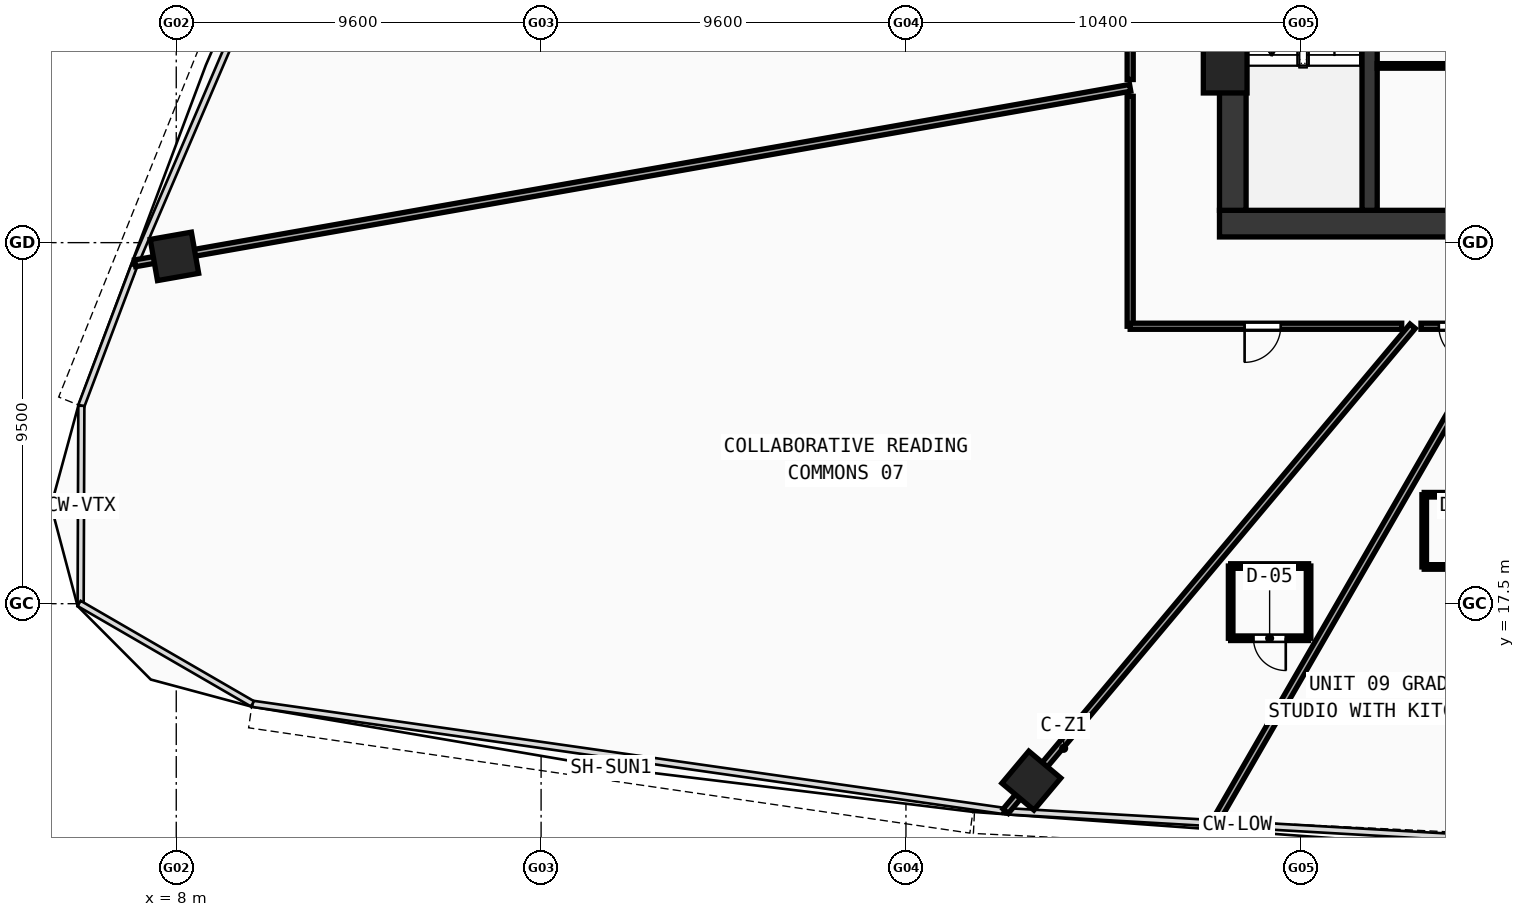
"""IFC4 building model, lengths in metres.
Left out: names, types, materials, properties, quantities, classifications, styles, units other than length and angle.
Written with IfcOpenShell. Run it as: python <this file> out.ifc"""

import sys

from ifc_helpers import new_model, si_unit, direction, frame, frame_2d, origin, origin_with_axes, origin_2d, place, context, subcontext, project, spatial, rectangle, hollow_rectangle, extrude, source, transform, mapped, element, fill, save


model = new_model("IFC4")
c1 = context("Model", 3, precision=1e-05, world=origin(), true_north=direction((0.0, 1.0)))
c2 = subcontext(c1, "Body", "Model", "MODEL_VIEW")
j1 = project(units=[si_unit("LENGTHUNIT", "METRE"), si_unit("PLANEANGLEUNIT", "RADIAN")], contexts=[c1])
p1 = place(None, origin())
s1 = spatial("IfcSite", under=j1, at=p1, CompositionType="ELEMENT")
p2 = place(p1, origin())
s2 = spatial("IfcBuilding", under=s1, at=p2, CompositionType="ELEMENT")
p3 = place(p2, frame((0.0, 0.0, 70.33)))
s3 = spatial("IfcBuildingStorey", under=s2, at=p3, CompositionType="ELEMENT", Elevation=70.33)
p4 = place(p3, frame((35.45, 27.5, 0.0), z_axis=(0.0, 0.0, 1.0), x_axis=(1.0, 0.0, 0.0)))
e1 = element("IfcWall", 1, at=p4, inside=s3, PredefinedType="SHEAR", context=c2, shape_type="SweptSolid", body=[
    extrude(rectangle(XDim=25.1, YDim=0.7, at=frame_2d((12.55, 0.0))), origin(), (0.0, 0.0, 1.0), 5.77),
])
p5 = place(p3, frame((35.8, 27.85, 0.0), z_axis=(0.0, 0.0, 1.0), x_axis=(0.0, 1.0, 0.0)))
e2 = element("IfcWall", 2, at=p5, inside=s3, PredefinedType="SHEAR", context=c2, shape_type="SweptSolid", body=[
    extrude(rectangle(XDim=12.0, YDim=0.7, at=frame_2d((6.0, 0.0))), origin(), (0.0, 0.0, 1.0), 5.77),
])
p6 = place(p3, frame((39.4, 27.85, 0.0), z_axis=(0.0, 0.0, 1.0), x_axis=(0.0, 1.0, 0.0)))
e3 = element("IfcWall", 3, at=p6, inside=s3, PredefinedType="SHEAR", context=c2, shape_type="SweptSolid", body=[
    extrude(rectangle(XDim=12.0, YDim=0.4, at=frame_2d((6.0, 0.0))), origin(), (0.0, 0.0, 1.0), 5.77),
])
p7 = place(p6, frame((9.9, 0.0, 0.0)))
e4 = element("IfcOpeningElement", 4, at=p7, cuts=e3, PredefinedType="OPENING", context=c2, shape_type="SweptSolid", body=[
    extrude(rectangle(XDim=1.1, YDim=2.1, at=frame_2d((0.55, 1.05))), frame((0.0, 0.21, 0.0), z_axis=(0.0, -1.0, 0.0), x_axis=(1.0, 0.0, 0.0)), (0.0, 0.0, 1.0), 0.42),
])
m1 = source(origin(), c2, "Body", "SweptSolid", [
    extrude(hollow_rectangle(XDim=1.15, YDim=1.15, WallThickness=0.048, at=origin_2d()), origin(), (0.0, 0.0, 1.0), 6.03),
])
p8 = place(p3, frame((35.6, 31.513, -0.26), z_axis=(0.0, 0.0, 1.0), x_axis=(1.0, 0.0, 0.0)))
e5 = element("IfcColumn", 5, at=p8, inside=s3, PredefinedType="COLUMN", context=c2, shape_type="MappedRepresentation", body=[
    mapped(m1, transform((0.0, 0.0, 0.0), scale=1.0)),
])
m2 = source(origin(), c2, "Body", "SweptSolid", [
    extrude(hollow_rectangle(XDim=1.1, YDim=1.1, WallThickness=0.045, at=origin_2d()), origin(), (0.0, 0.0, 1.0), 6.03),
])
for number, where, z_axis, x_axis in (
    (6, (30.5, 12.844, -0.26), (0.0, 0.0, 1.0), (0.766, -0.643, 0.0)),
    (7, (7.952, 26.638, -0.26), (0.0, 0.0, 1.0), (0.174, -0.985, 0.0)),
):
    element("IfcColumn", number, at=place(p3, frame(where, z_axis=z_axis, x_axis=x_axis)), inside=s3, PredefinedType="COLUMN", context=c2, shape_type="MappedRepresentation", body=[
        mapped(m2, transform((0.0, 0.0, 0.0), scale=1.0)),
    ])
p9 = place(p3, frame((39.6, 31.65, 0.0), z_axis=(0.0, 0.0, 1.0), x_axis=(1.0, 0.0, 0.0)))
e8 = element("IfcWall", 8, at=p9, inside=s3, PredefinedType="PARTITIONING", context=c2, shape_type="SweptSolid", body=[
    extrude(rectangle(XDim=2.72, YDim=0.12, at=frame_2d((1.36, 0.0))), origin(), (0.0, 0.0, 1.0), 5.77),
])
p10 = place(p3, frame((33.1, 31.073, 0.0), z_axis=(0.0, 0.0, 1.0), x_axis=(-0.984808509529, -0.173643887195, 0.0)))
e9 = element("IfcWall", 9, at=p10, inside=s3, PredefinedType="PARTITIONING", context=c2, shape_type="SweptSolid", body=[
    extrude(rectangle(XDim=26.586, YDim=0.18, at=frame_2d((13.293, 0.0))), origin(), (0.0, 0.0, 1.0), 2.42),
])
p11 = place(p3, frame((40.532, 24.8, 0.0), z_axis=(0.0, 0.0, 1.0), x_axis=(-0.642782945965, -0.766048356422, 0.0)))
e10 = element("IfcWall", 10, at=p11, inside=s3, PredefinedType="PARTITIONING", context=c2, shape_type="SweptSolid", body=[
    extrude(rectangle(XDim=16.657, YDim=0.18, at=frame_2d((8.329, 0.0))), origin(), (0.0, 0.0, 1.0), 2.42),
])
p12 = place(p3, frame((42.862, 24.8, 0.0), z_axis=(0.0, 0.0, 1.0), x_axis=(-0.499994448746, -0.866028608779, 0.0)))
e11 = element("IfcWall", 11, at=p12, inside=s3, PredefinedType="PARTITIONING", context=c2, shape_type="SweptSolid", body=[
    extrude(rectangle(XDim=15.099, YDim=0.18, at=frame_2d((7.55, 0.0))), origin(), (0.0, 0.0, 1.0), 5.07),
])
p13 = place(p3, frame((33.1, 24.8, 0.0), z_axis=(0.0, 0.0, 1.0), x_axis=(0.0, 1.0, 0.0)))
e12 = element("IfcWall", 12, at=p13, inside=s3, PredefinedType="PARTITIONING", context=c2, shape_type="SweptSolid", body=[
    extrude(rectangle(XDim=6.049, YDim=0.16, at=frame_2d((3.025, 0.0))), origin(), (0.0, 0.0, 1.0), 2.42),
])
p14 = place(p3, frame((33.1, 31.292, 0.0), z_axis=(0.0, 0.0, 1.0), x_axis=(0.0, 1.0, 0.0)))
e13 = element("IfcWall", 13, at=p14, inside=s3, PredefinedType="PARTITIONING", context=c2, shape_type="SweptSolid", body=[
    extrude(rectangle(XDim=7.029, YDim=0.16, at=frame_2d((3.515, 0.0))), origin(), (0.0, 0.0, 1.0), 2.42),
])
p15 = place(p14, frame((3.04, 0.0, 0.0)))
e14 = element("IfcOpeningElement", 14, at=p15, cuts=e13, PredefinedType="OPENING", context=c2, shape_type="SweptSolid", body=[
    extrude(rectangle(XDim=0.95, YDim=2.1, at=frame_2d((0.475, 1.05))), frame((0.0, 0.09, 0.0), z_axis=(0.0, -1.0, 0.0), x_axis=(1.0, 0.0, 0.0)), (0.0, 0.0, 1.0), 0.18),
])
p16 = place(p3, frame((42.608, 24.8, 0.0), z_axis=(0.0, 0.0, 1.0), x_axis=(-1.0, 0.0, 0.0)))
e15 = element("IfcWall", 15, at=p16, inside=s3, PredefinedType="PARTITIONING", context=c2, shape_type="SweptSolid", body=[
    extrude(rectangle(XDim=1.856, YDim=0.16, at=frame_2d((0.928, 0.0))), origin(), (0.0, 0.0, 1.0), 2.42),
])
p17 = place(p16, frame((0.436, 0.0, 0.0)))
e16 = element("IfcOpeningElement", 16, at=p17, cuts=e15, PredefinedType="OPENING", context=c2, shape_type="SweptSolid", body=[
    extrude(rectangle(XDim=0.95, YDim=2.1, at=frame_2d((0.475, 1.05))), frame((0.0, 0.09, 0.0), z_axis=(0.0, -1.0, 0.0), x_axis=(1.0, 0.0, 0.0)), (0.0, 0.0, 1.0), 0.18),
])
p18 = place(p3, frame((40.245, 24.8, 0.0), z_axis=(0.0, 0.0, 1.0), x_axis=(-1.0, 0.0, 0.0)))
e17 = element("IfcWall", 17, at=p18, inside=s3, PredefinedType="PARTITIONING", context=c2, shape_type="SweptSolid", body=[
    extrude(rectangle(XDim=7.145, YDim=0.16, at=frame_2d((3.572, 0.0))), origin(), (0.0, 0.0, 1.0), 2.42),
])
p19 = place(p18, frame((3.184, 0.0, 0.0)))
e18 = element("IfcOpeningElement", 18, at=p19, cuts=e17, PredefinedType="OPENING", context=c2, shape_type="SweptSolid", body=[
    extrude(rectangle(XDim=0.95, YDim=2.1, at=frame_2d((0.475, 1.05))), frame((0.0, 0.09, 0.0), z_axis=(0.0, -1.0, 0.0), x_axis=(1.0, 0.0, 0.0)), (0.0, 0.0, 1.0), 0.18),
])
p20 = place(p3, frame((35.744, 16.591, 0.0), z_axis=(0.0, 0.0, 1.0), x_axis=(1.0, 0.0, 0.0)))
e19 = element("IfcWall", 19, at=p20, inside=s3, PredefinedType="PARTITIONING", context=c2, shape_type="SweptSolid", body=[
    extrude(rectangle(XDim=2.05, YDim=0.12, at=frame_2d((1.025, 0.0))), origin(), (0.0, 0.0, 1.0), 5.77),
])
p21 = place(p20, frame((0.6, 0.0, 0.0)))
e20 = element("IfcOpeningElement", 20, at=p21, cuts=e19, PredefinedType="OPENING", context=c2, shape_type="SweptSolid", body=[
    extrude(rectangle(XDim=0.85, YDim=2.1, at=frame_2d((0.425, 1.05))), frame((0.0, 0.07, 0.0), z_axis=(0.0, -1.0, 0.0), x_axis=(1.0, 0.0, 0.0)), (0.0, 0.0, 1.0), 0.14),
])
p22 = place(p3, frame((37.794, 16.591, 0.0), z_axis=(0.0, 0.0, 1.0), x_axis=(0.0, 1.0, 0.0)))
e21 = element("IfcWall", 21, at=p22, inside=s3, PredefinedType="PARTITIONING", context=c2, shape_type="SweptSolid", body=[
    extrude(rectangle(XDim=1.9, YDim=0.12, at=frame_2d((0.95, 0.0))), origin(), (0.0, 0.0, 1.0), 5.37),
])
p23 = place(p3, frame((37.794, 18.491, 0.0), z_axis=(0.0, 0.0, 1.0), x_axis=(-1.0, 0.0, 0.0)))
e22 = element("IfcWall", 22, at=p23, inside=s3, PredefinedType="PARTITIONING", context=c2, shape_type="SweptSolid", body=[
    extrude(rectangle(XDim=2.05, YDim=0.12, at=frame_2d((1.025, 0.0))), origin(), (0.0, 0.0, 1.0), 2.42),
])
p24 = place(p3, frame((35.744, 18.491, 0.0), z_axis=(0.0, 0.0, 1.0), x_axis=(0.0, -1.0, 0.0)))
e23 = element("IfcWall", 23, at=p24, inside=s3, PredefinedType="PARTITIONING", context=c2, shape_type="SweptSolid", body=[
    extrude(rectangle(XDim=1.9, YDim=0.12, at=frame_2d((0.95, 0.0))), origin(), (0.0, 0.0, 1.0), 2.42),
])
p25 = place(p3, frame((40.837, 18.467, 0.0), z_axis=(0.0, 0.0, 1.0), x_axis=(1.0, 0.0, 0.0)))
e24 = element("IfcWall", 24, at=p25, inside=s3, PredefinedType="PARTITIONING", context=c2, shape_type="SweptSolid", body=[
    extrude(rectangle(XDim=2.05, YDim=0.12, at=frame_2d((1.025, 0.0))), origin(), (0.0, 0.0, 1.0), 5.77),
])
p26 = place(p25, frame((0.6, 0.0, 0.0)))
e25 = element("IfcOpeningElement", 25, at=p26, cuts=e24, PredefinedType="OPENING", context=c2, shape_type="SweptSolid", body=[
    extrude(rectangle(XDim=0.85, YDim=2.1, at=frame_2d((0.425, 1.05))), frame((0.0, 0.07, 0.0), z_axis=(0.0, -1.0, 0.0), x_axis=(1.0, 0.0, 0.0)), (0.0, 0.0, 1.0), 0.14),
])
p27 = place(p3, frame((42.887, 20.367, 0.0), z_axis=(0.0, 0.0, 1.0), x_axis=(-1.0, 0.0, 0.0)))
e26 = element("IfcWall", 26, at=p27, inside=s3, PredefinedType="PARTITIONING", context=c2, shape_type="SweptSolid", body=[
    extrude(rectangle(XDim=2.05, YDim=0.12, at=frame_2d((1.025, 0.0))), origin(), (0.0, 0.0, 1.0), 5.77),
])
p28 = place(p3, frame((40.837, 20.367, 0.0), z_axis=(0.0, 0.0, 1.0), x_axis=(0.0, -1.0, 0.0)))
e27 = element("IfcWall", 27, at=p28, inside=s3, PredefinedType="PARTITIONING", context=c2, shape_type="SweptSolid", body=[
    extrude(rectangle(XDim=1.9, YDim=0.12, at=frame_2d((0.95, 0.0))), origin(), (0.0, 0.0, 1.0), 5.77),
])
m3 = source(origin(), c2, "Body", "SweptSolid", [
    extrude(rectangle(XDim=0.95, YDim=2.1, at=frame_2d((0.475, 1.05))), frame((0.0, 0.025, 0.0), z_axis=(0.0, -1.0, 0.0), x_axis=(1.0, 0.0, 0.0)), (0.0, 0.0, 1.0), 0.05),
])
p29 = place(p19, origin_with_axes())
e28 = element("IfcDoor", 28, at=p29, inside=s3, OperationType="SINGLE_SWING_RIGHT", PredefinedType="DOOR", context=c2, shape_type="MappedRepresentation", body=[
    mapped(m3, transform((0.0, 0.0, 0.0), scale=1.0)),
])
fill(e18, e28)
p30 = place(p17, origin_with_axes())
e29 = element("IfcDoor", 29, at=p30, inside=s3, OperationType="SINGLE_SWING_LEFT", PredefinedType="DOOR", context=c2, shape_type="MappedRepresentation", body=[
    mapped(m3, transform((0.0, 0.0, 0.0), scale=1.0)),
])
fill(e16, e29)
m4 = source(origin(), c2, "Body", "SweptSolid", [
    extrude(rectangle(XDim=0.85, YDim=2.1, at=frame_2d((0.425, 1.05))), frame((0.0, 0.025, 0.0), z_axis=(0.0, -1.0, 0.0), x_axis=(1.0, 0.0, 0.0)), (0.0, 0.0, 1.0), 0.05),
])
p31 = place(p21, frame((0.85, 0.0, 0.0), z_axis=(0.0, 0.0, 1.0), x_axis=(-1.0, 0.0, 0.0)))
e30 = element("IfcDoor", 30, at=p31, inside=s3, OperationType="SINGLE_SWING_LEFT", PredefinedType="DOOR", context=c2, shape_type="MappedRepresentation", body=[
    mapped(m4, transform((0.0, 0.0, 0.0), scale=1.0)),
])
fill(e20, e30)
save(model, sys.argv[1])
